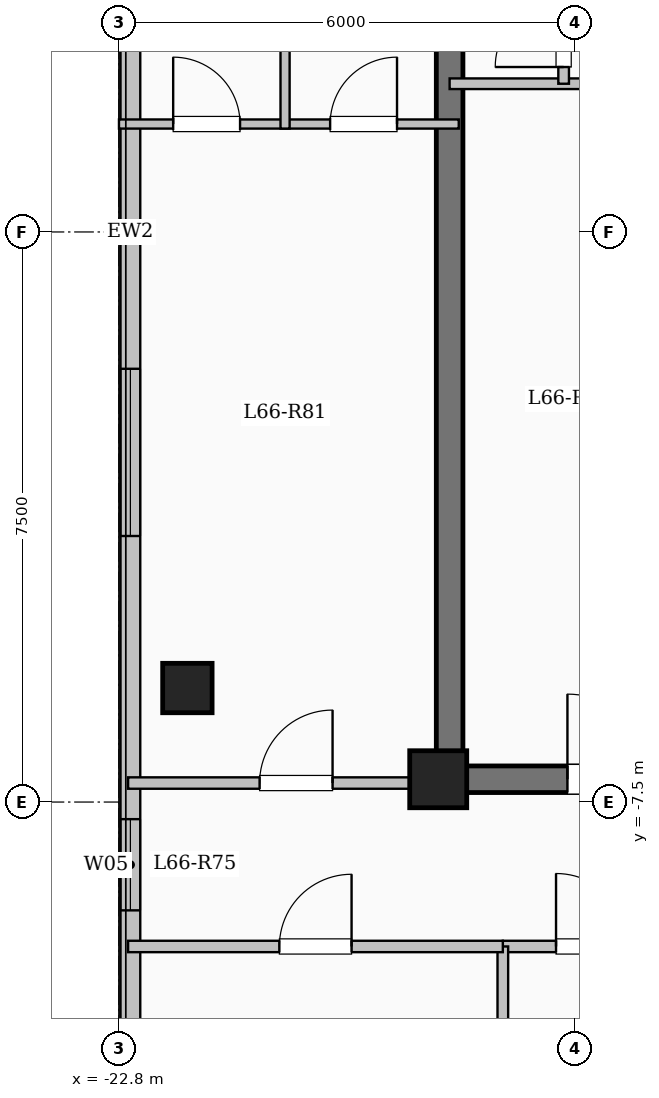
"""IFC4 building model, lengths in metres.
Left out: names, types, materials, properties, quantities, classifications, styles, units other than length and angle.
Written with IfcOpenShell. Run it as: python <this file> out.ifc"""

import sys

from ifc_helpers import new_model, si_unit, direction, frame, frame_2d, origin, origin_2d, place, context, subcontext, project, spatial, rectangle, extrude, element, fill, save


model = new_model("IFC4")
c1 = context("Model", 3, precision=1e-05, world=origin(), true_north=direction((0.0, 1.0)))
c2 = subcontext(c1, "Body", "Model", "MODEL_VIEW")
j1 = project(units=[si_unit("LENGTHUNIT", "METRE"), si_unit("PLANEANGLEUNIT", "RADIAN")], contexts=[c1])
p1 = place(None, origin())
s1 = spatial("IfcSite", under=j1, at=p1, CompositionType="ELEMENT")
p2 = place(p1, origin())
s2 = spatial("IfcBuilding", under=s1, at=p2, CompositionType="ELEMENT")
p3 = place(p2, frame((0.0, 0.0, 244.85)))
s3 = spatial("IfcBuildingStorey", under=s2, at=p3, CompositionType="ELEMENT", Elevation=244.85)
p4 = place(p3, frame((-18.6, -7.2, 0.0), z_axis=(0.0, 0.0, 1.0), x_axis=(1.0, 0.0, 0.0)))
e1 = element("IfcColumn", 1, at=p4, inside=s3, PredefinedType="COLUMN", context=c2, shape_type="SweptSolid", body=[
    extrude(rectangle(XDim=0.75, YDim=0.75, at=origin_2d()), origin(), (0.0, 0.0, 1.0), 3.35),
])
p5 = place(p3, frame((-21.9, -6.0, 0.0), z_axis=(0.0, 0.0, 1.0), x_axis=(1.0, 0.0, 0.0)))
e2 = element("IfcColumn", 2, at=p5, inside=s3, PredefinedType="COLUMN", context=c2, shape_type="SweptSolid", body=[
    extrude(rectangle(XDim=0.65, YDim=0.65, at=origin_2d()), origin(), (0.0, 0.0, 1.0), 3.35),
])
p6 = place(p3, frame((-22.65, -17.55, 0.0), z_axis=(0.0, 0.0, 1.0), x_axis=(0.0, 1.0, 0.0)))
e3 = element("IfcWall", 3, at=p6, inside=s3, PredefinedType="SOLIDWALL", context=c2, shape_type="SweptSolid", body=[
    extrude(rectangle(XDim=35.1, YDim=0.26, at=frame_2d((17.55, 0.0))), origin(), (0.0, 0.0, 1.0), 3.1),
])
p7 = place(p6, frame((2.975, 0.0, 0.9)))
e4 = element("IfcOpeningElement", 4, at=p7, cuts=e3, PredefinedType="OPENING", context=c2, shape_type="SweptSolid", body=[
    extrude(rectangle(XDim=2.2, YDim=1.75, at=frame_2d((1.1, 0.875))), frame((0.0, 0.14, 0.0), z_axis=(0.0, -1.0, 0.0), x_axis=(1.0, 0.0, 0.0)), (0.0, 0.0, 1.0), 0.28),
])
p8 = place(p6, frame((8.625, 0.0, 0.95)))
e5 = element("IfcOpeningElement", 5, at=p8, cuts=e3, PredefinedType="OPENING", context=c2, shape_type="SweptSolid", body=[
    extrude(rectangle(XDim=1.2, YDim=1.5, at=frame_2d((0.6, 0.75))), frame((0.0, 0.14, 0.0), z_axis=(0.0, -1.0, 0.0), x_axis=(1.0, 0.0, 0.0)), (0.0, 0.0, 1.0), 0.28),
])
p9 = place(p6, frame((13.55, 0.0, 0.9)))
e6 = element("IfcOpeningElement", 6, at=p9, cuts=e3, PredefinedType="OPENING", context=c2, shape_type="SweptSolid", body=[
    extrude(rectangle(XDim=2.2, YDim=1.75, at=frame_2d((1.1, 0.875))), frame((0.0, 0.14, 0.0), z_axis=(0.0, -1.0, 0.0), x_axis=(1.0, 0.0, 0.0)), (0.0, 0.0, 1.0), 0.28),
])
p10 = place(p6, frame((19.95, 0.0, 0.9)))
e7 = element("IfcOpeningElement", 7, at=p10, cuts=e3, PredefinedType="OPENING", context=c2, shape_type="SweptSolid", body=[
    extrude(rectangle(XDim=1.65, YDim=1.6, at=frame_2d((0.825, 0.8))), frame((0.0, 0.14, 0.0), z_axis=(0.0, -1.0, 0.0), x_axis=(1.0, 0.0, 0.0)), (0.0, 0.0, 1.0), 0.28),
])
p11 = place(p6, frame((24.425, 0.0, 0.9)))
e8 = element("IfcOpeningElement", 8, at=p11, cuts=e3, PredefinedType="OPENING", context=c2, shape_type="SweptSolid", body=[
    extrude(rectangle(XDim=2.0, YDim=1.7, at=frame_2d((1.0, 0.85))), frame((0.0, 0.14, 0.0), z_axis=(0.0, -1.0, 0.0), x_axis=(1.0, 0.0, 0.0)), (0.0, 0.0, 1.0), 0.28),
])
p12 = place(p6, frame((28.675, 0.0, 0.95)))
e9 = element("IfcOpeningElement", 9, at=p12, cuts=e3, PredefinedType="OPENING", context=c2, shape_type="SweptSolid", body=[
    extrude(rectangle(XDim=1.0, YDim=1.5, at=frame_2d((0.5, 0.75))), frame((0.0, 0.14, 0.0), z_axis=(0.0, -1.0, 0.0), x_axis=(1.0, 0.0, 0.0)), (0.0, 0.0, 1.0), 0.28),
])
p13 = place(p6, frame((31.6, 0.0, 0.9)))
e10 = element("IfcOpeningElement", 10, at=p13, cuts=e3, PredefinedType="OPENING", context=c2, shape_type="SweptSolid", body=[
    extrude(rectangle(XDim=2.0, YDim=1.7, at=frame_2d((1.0, 0.85))), frame((0.0, 0.14, 0.0), z_axis=(0.0, -1.0, 0.0), x_axis=(1.0, 0.0, 0.0)), (0.0, 0.0, 1.0), 0.28),
])
p14 = place(p3, frame((-18.45, -7.375, 0.0), z_axis=(0.0, 0.0, 1.0), x_axis=(0.0, 1.0, 0.0)))
e11 = element("IfcWall", 11, at=p14, inside=s3, PredefinedType="SHEAR", context=c2, shape_type="SweptSolid", body=[
    extrude(rectangle(XDim=14.05, YDim=0.35, at=frame_2d((7.025, 0.0))), origin(), (0.0, 0.0, 1.0), 3.35),
])
p15 = place(p3, frame((-18.625, -7.2, 0.0), z_axis=(0.0, 0.0, 1.0), x_axis=(1.0, 0.0, 0.0)))
e12 = element("IfcWall", 12, at=p15, inside=s3, PredefinedType="SHEAR", context=c2, shape_type="SweptSolid", body=[
    extrude(rectangle(XDim=8.55, YDim=0.35, at=frame_2d((4.275, 0.0))), origin(), (0.0, 0.0, 1.0), 3.35),
])
p16 = place(p15, frame((1.725, 0.0, 0.0)))
e13 = element("IfcOpeningElement", 13, at=p16, cuts=e12, PredefinedType="OPENING", context=c2, shape_type="SweptSolid", body=[
    extrude(rectangle(XDim=1.12, YDim=2.15, at=frame_2d((0.56, 1.075))), frame((0.0, 0.185, 0.0), z_axis=(0.0, -1.0, 0.0), x_axis=(1.0, 0.0, 0.0)), (0.0, 0.0, 1.0), 0.37),
])
p17 = place(p3, frame((-18.45, 1.95, 0.0), z_axis=(0.0, 0.0, 1.0), x_axis=(1.0, 0.0, 0.0)))
e14 = element("IfcWall", 14, at=p17, inside=s3, PredefinedType="PARTITIONING", context=c2, shape_type="SweptSolid", body=[
    extrude(rectangle(XDim=3.15, YDim=0.14, at=frame_2d((1.575, 0.0))), origin(), (0.0, 0.0, 1.0), 3.1),
])
p18 = place(p17, frame((1.9, 0.0, 0.0)))
e15 = element("IfcOpeningElement", 15, at=p18, cuts=e14, PredefinedType="OPENING", context=c2, shape_type="SweptSolid", body=[
    extrude(rectangle(XDim=0.9, YDim=2.08, at=frame_2d((0.45, 1.04))), frame((0.0, 0.08, 0.0), z_axis=(0.0, -1.0, 0.0), x_axis=(1.0, 0.0, 0.0)), (0.0, 0.0, 1.0), 0.16),
])
p19 = place(p3, frame((-16.95, 1.95, 0.0), z_axis=(0.0, 0.0, 1.0), x_axis=(0.0, 1.0, 0.0)))
e16 = element("IfcWall", 16, at=p19, inside=s3, PredefinedType="PARTITIONING", context=c2, shape_type="SweptSolid", body=[
    extrude(rectangle(XDim=1.3, YDim=0.14, at=frame_2d((0.65, 0.0))), origin(), (0.0, 0.0, 1.0), 3.1),
])
p20 = place(p19, frame((0.22, 0.0, 0.0)))
e17 = element("IfcOpeningElement", 17, at=p20, cuts=e16, PredefinedType="OPENING", context=c2, shape_type="SweptSolid", body=[
    extrude(rectangle(XDim=0.9, YDim=2.08, at=frame_2d((0.45, 1.04))), frame((0.0, 0.08, 0.0), z_axis=(0.0, -1.0, 0.0), x_axis=(1.0, 0.0, 0.0)), (0.0, 0.0, 1.0), 0.16),
])
p21 = place(p3, frame((-17.75, -9.4, 0.0), z_axis=(0.0, 0.0, 1.0), x_axis=(1.0, 0.0, 0.0)))
e18 = element("IfcWall", 18, at=p21, inside=s3, PredefinedType="PARTITIONING", context=c2, shape_type="SweptSolid", body=[
    extrude(rectangle(XDim=9.2, YDim=0.15, at=frame_2d((4.6, 0.0))), origin(), (0.0, 0.0, 1.0), 3.1),
])
p22 = place(p21, frame((0.7, 0.0, 0.0)))
e19 = element("IfcOpeningElement", 19, at=p22, cuts=e18, PredefinedType="OPENING", context=c2, shape_type="SweptSolid", body=[
    extrude(rectangle(XDim=0.96, YDim=2.15, at=frame_2d((0.48, 1.075))), frame((0.0, 0.085, 0.0), z_axis=(0.0, -1.0, 0.0), x_axis=(1.0, 0.0, 0.0)), (0.0, 0.0, 1.0), 0.17),
])
p23 = place(p3, frame((-22.68, -7.25, 0.0), z_axis=(0.0, 0.0, 1.0), x_axis=(1.0, 0.0, 0.0)))
e20 = element("IfcWall", 20, at=p23, inside=s3, PredefinedType="PARTITIONING", context=c2, shape_type="SweptSolid", body=[
    extrude(rectangle(XDim=4.23, YDim=0.15, at=frame_2d((2.115, 0.0))), origin(), (0.0, 0.0, 1.0), 3.1),
])
p24 = place(p23, frame((1.73, 0.0, 0.0)))
e21 = element("IfcOpeningElement", 21, at=p24, cuts=e20, PredefinedType="OPENING", context=c2, shape_type="SweptSolid", body=[
    extrude(rectangle(XDim=0.96, YDim=2.15, at=frame_2d((0.48, 1.075))), frame((0.0, 0.085, 0.0), z_axis=(0.0, -1.0, 0.0), x_axis=(1.0, 0.0, 0.0)), (0.0, 0.0, 1.0), 0.17),
])
p25 = place(p3, frame((-17.75, -17.55, 0.0), z_axis=(0.0, 0.0, 1.0), x_axis=(0.0, 1.0, 0.0)))
e22 = element("IfcWall", 22, at=p25, inside=s3, PredefinedType="PARTITIONING", context=c2, shape_type="SweptSolid", body=[
    extrude(rectangle(XDim=8.15, YDim=0.14, at=frame_2d((4.075, 0.0))), origin(), (0.0, 0.0, 1.0), 3.1),
])
p26 = place(p3, frame((-22.68, -9.4, 0.0), z_axis=(0.0, 0.0, 1.0), x_axis=(1.0, 0.0, 0.0)))
e23 = element("IfcWall", 23, at=p26, inside=s3, PredefinedType="PARTITIONING", context=c2, shape_type="SweptSolid", body=[
    extrude(rectangle(XDim=4.93, YDim=0.15, at=frame_2d((2.465, 0.0))), origin(), (0.0, 0.0, 1.0), 3.1),
])
p27 = place(p26, frame((1.99, 0.0, 0.0)))
e24 = element("IfcOpeningElement", 24, at=p27, cuts=e23, PredefinedType="OPENING", context=c2, shape_type="SweptSolid", body=[
    extrude(rectangle(XDim=0.95, YDim=2.15, at=frame_2d((0.475, 1.075))), frame((0.0, 0.085, 0.0), z_axis=(0.0, -1.0, 0.0), x_axis=(1.0, 0.0, 0.0)), (0.0, 0.0, 1.0), 0.17),
])
p28 = place(p3, frame((-22.8, 1.42, 0.0), z_axis=(0.0, 0.0, 1.0), x_axis=(1.0, 0.0, 0.0)))
e25 = element("IfcWall", 25, at=p28, inside=s3, PredefinedType="PARTITIONING", context=c2, shape_type="SweptSolid", body=[
    extrude(rectangle(XDim=4.47, YDim=0.12, at=frame_2d((2.235, 0.0))), origin(), (0.0, 0.0, 1.0), 3.1),
])
p29 = place(p28, frame((0.713, 0.0, 0.0)))
e26 = element("IfcOpeningElement", 26, at=p29, cuts=e25, PredefinedType="OPENING", context=c2, shape_type="SweptSolid", body=[
    extrude(rectangle(XDim=0.88, YDim=2.1, at=frame_2d((0.44, 1.05))), frame((0.0, 0.07, 0.0), z_axis=(0.0, -1.0, 0.0), x_axis=(1.0, 0.0, 0.0)), (0.0, 0.0, 1.0), 0.14),
])
p30 = place(p28, frame((2.778, 0.0, 0.0)))
e27 = element("IfcOpeningElement", 27, at=p30, cuts=e25, PredefinedType="OPENING", context=c2, shape_type="SweptSolid", body=[
    extrude(rectangle(XDim=0.88, YDim=2.1, at=frame_2d((0.44, 1.05))), frame((0.0, 0.07, 0.0), z_axis=(0.0, -1.0, 0.0), x_axis=(1.0, 0.0, 0.0)), (0.0, 0.0, 1.0), 0.14),
])
p31 = place(p3, frame((-20.615, 1.36, 0.0), z_axis=(0.0, 0.0, 1.0), x_axis=(0.0, 1.0, 0.0)))
e28 = element("IfcWall", 28, at=p31, inside=s3, PredefinedType="PARTITIONING", context=c2, shape_type="SweptSolid", body=[
    extrude(rectangle(XDim=3.58, YDim=0.12, at=frame_2d((1.79, 0.0))), origin(), (0.0, 0.0, 1.0), 3.1),
])
p32 = place(p8, origin())
e29 = element("IfcWindow", 29, at=p32, inside=s3, PartitioningType="SINGLE_PANEL", PredefinedType="WINDOW", context=c2, shape_type="SweptSolid", body=[
    extrude(rectangle(XDim=1.2, YDim=1.5, at=frame_2d((0.6, 0.75))), frame((0.0, 0.03, 0.0), z_axis=(0.0, -1.0, 0.0), x_axis=(1.0, 0.0, 0.0)), (0.0, 0.0, 1.0), 0.06),
])
fill(e5, e29)
p33 = place(p9, origin())
e30 = element("IfcWindow", 30, at=p33, inside=s3, PartitioningType="SINGLE_PANEL", PredefinedType="WINDOW", context=c2, shape_type="SweptSolid", body=[
    extrude(rectangle(XDim=2.2, YDim=1.75, at=frame_2d((1.1, 0.875))), frame((0.0, 0.03, 0.0), z_axis=(0.0, -1.0, 0.0), x_axis=(1.0, 0.0, 0.0)), (0.0, 0.0, 1.0), 0.06),
])
fill(e6, e30)
p34 = place(p16, origin())
e31 = element("IfcDoor", 31, at=p34, inside=s3, OperationType="SINGLE_SWING_LEFT", PredefinedType="DOOR", context=c2, shape_type="SweptSolid", body=[
    extrude(rectangle(XDim=1.12, YDim=2.15, at=frame_2d((0.56, 1.075))), frame((0.0, 0.025, 0.0), z_axis=(0.0, -1.0, 0.0), x_axis=(1.0, 0.0, 0.0)), (0.0, 0.0, 1.0), 0.05),
])
fill(e13, e31)
p35 = place(p20, origin())
e32 = element("IfcDoor", 32, at=p35, inside=s3, OperationType="SINGLE_SWING_LEFT", PredefinedType="DOOR", context=c2, shape_type="SweptSolid", body=[
    extrude(rectangle(XDim=0.9, YDim=2.08, at=frame_2d((0.45, 1.04))), frame((0.0, 0.025, 0.0), z_axis=(0.0, -1.0, 0.0), x_axis=(1.0, 0.0, 0.0)), (0.0, 0.0, 1.0), 0.05),
])
fill(e17, e32)
p36 = place(p22, origin())
e33 = element("IfcDoor", 33, at=p36, inside=s3, OperationType="SINGLE_SWING_LEFT", PredefinedType="DOOR", context=c2, shape_type="SweptSolid", body=[
    extrude(rectangle(XDim=0.96, YDim=2.15, at=frame_2d((0.48, 1.075))), frame((0.0, 0.025, 0.0), z_axis=(0.0, -1.0, 0.0), x_axis=(1.0, 0.0, 0.0)), (0.0, 0.0, 1.0), 0.05),
])
fill(e19, e33)
p37 = place(p27, origin())
e34 = element("IfcDoor", 34, at=p37, inside=s3, OperationType="SINGLE_SWING_RIGHT", PredefinedType="DOOR", context=c2, shape_type="SweptSolid", body=[
    extrude(rectangle(XDim=0.95, YDim=2.15, at=frame_2d((0.475, 1.075))), frame((0.0, 0.025, 0.0), z_axis=(0.0, -1.0, 0.0), x_axis=(1.0, 0.0, 0.0)), (0.0, 0.0, 1.0), 0.05),
])
fill(e24, e34)
p38 = place(p24, origin())
e35 = element("IfcDoor", 35, at=p38, inside=s3, OperationType="SINGLE_SWING_RIGHT", PredefinedType="DOOR", context=c2, shape_type="SweptSolid", body=[
    extrude(rectangle(XDim=0.96, YDim=2.15, at=frame_2d((0.48, 1.075))), frame((0.0, 0.025, 0.0), z_axis=(0.0, -1.0, 0.0), x_axis=(1.0, 0.0, 0.0)), (0.0, 0.0, 1.0), 0.05),
])
fill(e21, e35)
p39 = place(p29, origin())
e36 = element("IfcDoor", 36, at=p39, inside=s3, OperationType="SINGLE_SWING_LEFT", PredefinedType="DOOR", context=c2, shape_type="SweptSolid", body=[
    extrude(rectangle(XDim=0.88, YDim=2.1, at=frame_2d((0.44, 1.05))), frame((0.0, 0.025, 0.0), z_axis=(0.0, -1.0, 0.0), x_axis=(1.0, 0.0, 0.0)), (0.0, 0.0, 1.0), 0.05),
])
fill(e26, e36)
p40 = place(p30, origin())
e37 = element("IfcDoor", 37, at=p40, inside=s3, OperationType="SINGLE_SWING_RIGHT", PredefinedType="DOOR", context=c2, shape_type="SweptSolid", body=[
    extrude(rectangle(XDim=0.88, YDim=2.1, at=frame_2d((0.44, 1.05))), frame((0.0, 0.025, 0.0), z_axis=(0.0, -1.0, 0.0), x_axis=(1.0, 0.0, 0.0)), (0.0, 0.0, 1.0), 0.05),
])
fill(e27, e37)
save(model, sys.argv[1])
